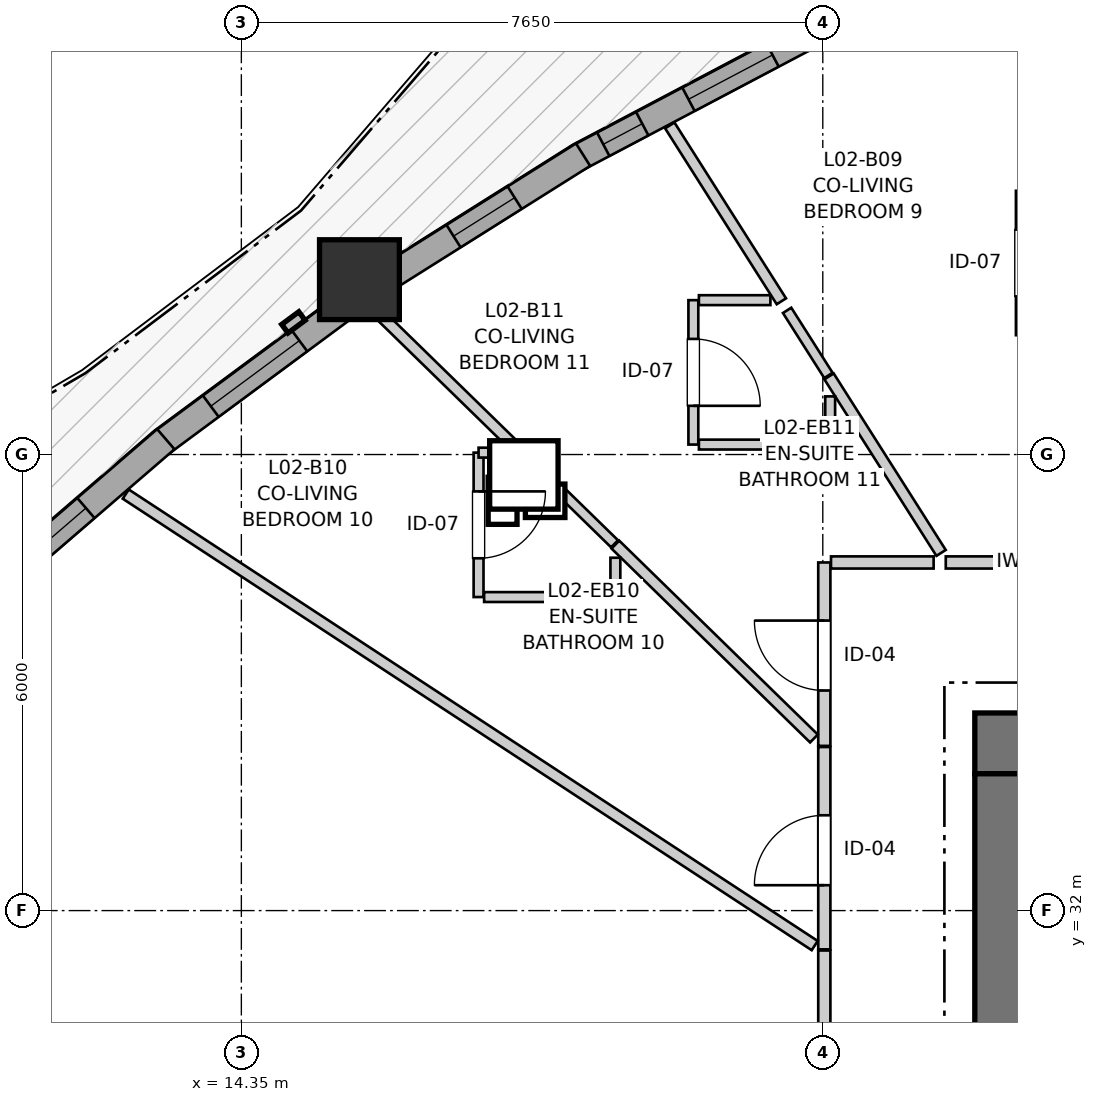
"""IFC4 building model, lengths in metres.
Left out: names, types, materials, properties, quantities, classifications, styles, units other than length and angle.
Written with IfcOpenShell. Run it as: python <this file> out.ifc"""

import sys

from ifc_helpers import new_model, si_unit, direction, frame, frame_2d, origin, origin_2d, place, context, subcontext, project, spatial, rectangle, extrude, source, transform, mapped, element, fill, save


model = new_model("IFC4")
c1 = context("Model", 3, precision=1e-05, world=origin(), true_north=direction((0.0, 1.0)))
c2 = subcontext(c1, "Body", "Model", "MODEL_VIEW")
j1 = project(units=[si_unit("LENGTHUNIT", "METRE"), si_unit("PLANEANGLEUNIT", "RADIAN")], contexts=[c1])
p1 = place(None, origin())
s1 = spatial("IfcSite", under=j1, at=p1, CompositionType="ELEMENT")
p2 = place(p1, origin())
s2 = spatial("IfcBuilding", under=s1, at=p2, CompositionType="ELEMENT")
p3 = place(p2, frame((0.0, 0.0, 11.0)))
s3 = spatial("IfcBuildingStorey", under=s2, at=p3, CompositionType="ELEMENT", Elevation=11.0)
p4 = place(p3, frame((36.7, 34.2, 0.0), z_axis=(0.0, 0.0, 1.0), x_axis=(-1.0, 0.0, 0.0)))
e1 = element("IfcWall", 1, at=p4, inside=s3, PredefinedType="SHEAR", context=c2, shape_type="SweptSolid", body=[
    extrude(rectangle(XDim=12.7, YDim=0.8, at=frame_2d((6.35, 0.0))), origin(), (0.0, 0.0, 1.0), 2.94),
])
p5 = place(p3, frame((24.4, 33.8, 0.0), z_axis=(0.0, 0.0, 1.0), x_axis=(0.0, -1.0, 0.0)))
e2 = element("IfcWall", 2, at=p5, inside=s3, PredefinedType="SHEAR", context=c2, shape_type="SweptSolid", body=[
    extrude(rectangle(XDim=15.6, YDim=0.8, at=frame_2d((7.8, 0.0))), origin(), (0.0, 0.0, 1.0), 2.94),
])
p6 = place(p5, frame((7.05, 0.0, 0.0)))
e3 = element("IfcOpeningElement", 3, at=p6, cuts=e2, PredefinedType="OPENING", context=c2, shape_type="SweptSolid", body=[
    extrude(rectangle(XDim=1.5, YDim=2.15, at=frame_2d((0.75, 1.075))), frame((0.0, 0.41, 0.0), z_axis=(0.0, -1.0, 0.0), x_axis=(1.0, 0.0, 0.0)), (0.0, 0.0, 1.0), 0.82),
])
p7 = place(p5, frame((3.52, 0.0, 0.0)))
e4 = element("IfcOpeningElement", 4, at=p7, cuts=e2, PredefinedType="OPENING", context=c2, shape_type="SweptSolid", body=[
    extrude(rectangle(XDim=0.86, YDim=2.05, at=frame_2d((0.43, 1.025))), frame((0.0, 0.41, 0.0), z_axis=(0.0, -1.0, 0.0), x_axis=(1.0, 0.0, 0.0)), (0.0, 0.0, 1.0), 0.82),
])
p8 = place(p5, frame((11.22, 0.0, 0.0)))
e5 = element("IfcOpeningElement", 5, at=p8, cuts=e2, PredefinedType="OPENING", context=c2, shape_type="SweptSolid", body=[
    extrude(rectangle(XDim=0.86, YDim=2.05, at=frame_2d((0.43, 1.025))), frame((0.0, 0.41, 0.0), z_axis=(0.0, -1.0, 0.0), x_axis=(1.0, 0.0, 0.0)), (0.0, 0.0, 1.0), 0.82),
])
m1 = source(origin(), c2, "Body", "SweptSolid", [
    extrude(rectangle(XDim=1.05, YDim=1.05, at=origin_2d()), origin(), (0.0, 0.0, 1.0), 2.94),
])
p9 = place(p3, frame((15.904, 40.301, 0.0), z_axis=(0.0, 0.0, 1.0), x_axis=(1.0, 0.0, 0.0)))
e6 = element("IfcColumn", 6, at=p9, inside=s3, PredefinedType="COLUMN", context=c2, shape_type="MappedRepresentation", body=[
    mapped(m1, transform((0.0, 0.0, 0.0), x_axis=(1.0, 0.0, 0.0), y_axis=(0.0, 1.0, 0.0), z_axis=(0.0, 0.0, 1.0), scale=1.0)),
])
p10 = place(p3, frame((21.728, 43.462, 0.0), z_axis=(0.0, 0.0, 1.0), x_axis=(-0.884404833282, -0.466720570435, 0.0)))
e7 = element("IfcWall", 7, at=p10, inside=s3, PredefinedType="SOLIDWALL", context=c2, shape_type="SweptSolid", body=[
    extrude(rectangle(XDim=3.346, YDim=0.35, at=frame_2d((1.673, 0.0))), origin(), (0.0, 0.0, 1.0), 2.42),
])
p11 = place(p10, frame((0.44, 0.0, 0.82)))
e8 = element("IfcOpeningElement", 8, at=p11, cuts=e7, PredefinedType="OPENING", context=c2, shape_type="SweptSolid", body=[
    extrude(rectangle(XDim=1.25, YDim=1.35, at=frame_2d((0.625, 0.675))), frame((0.0, 0.185, 0.0), z_axis=(0.0, -1.0, 0.0), x_axis=(1.0, 0.0, 0.0)), (0.0, 0.0, 1.0), 0.37),
])
p12 = place(p10, frame((2.378, 0.0, 0.82)))
e9 = element("IfcOpeningElement", 9, at=p12, cuts=e7, PredefinedType="OPENING", context=c2, shape_type="SweptSolid", body=[
    extrude(rectangle(XDim=0.58, YDim=1.35, at=frame_2d((0.29, 0.675))), frame((0.0, 0.185, 0.0), z_axis=(0.0, -1.0, 0.0), x_axis=(1.0, 0.0, 0.0)), (0.0, 0.0, 1.0), 0.37),
])
p13 = place(p3, frame((18.846, 41.945, 0.0), z_axis=(0.0, 0.0, 1.0), x_axis=(-0.846424281274, -0.532509094824, 0.0)))
e10 = element("IfcWall", 10, at=p13, inside=s3, PredefinedType="SOLIDWALL", context=c2, shape_type="SweptSolid", body=[
    extrude(rectangle(XDim=3.066, YDim=0.35, at=frame_2d((1.533, 0.0))), origin(), (0.0, 0.0, 1.0), 2.42),
])
p14 = place(p13, frame((1.063, 0.0, 0.82)))
e11 = element("IfcOpeningElement", 11, at=p14, cuts=e10, PredefinedType="OPENING", context=c2, shape_type="SweptSolid", body=[
    extrude(rectangle(XDim=0.95, YDim=1.35, at=frame_2d((0.475, 0.675))), frame((0.0, 0.185, 0.0), z_axis=(0.0, -1.0, 0.0), x_axis=(1.0, 0.0, 0.0)), (0.0, 0.0, 1.0), 0.37),
])
p15 = place(p3, frame((15.767, 39.981, 0.0), z_axis=(0.0, 0.0, 1.0), x_axis=(-0.803838872114, -0.59484709605, 0.0)))
e12 = element("IfcWall", 12, at=p15, inside=s3, PredefinedType="SOLIDWALL", context=c2, shape_type="SweptSolid", body=[
    extrude(rectangle(XDim=3.085, YDim=0.35, at=frame_2d((1.542, 0.0))), origin(), (0.0, 0.0, 1.0), 2.42),
])
p16 = place(p15, frame((0.812, 0.0, 0.82)))
e13 = element("IfcOpeningElement", 13, at=p16, cuts=e12, PredefinedType="OPENING", context=c2, shape_type="SweptSolid", body=[
    extrude(rectangle(XDim=1.45, YDim=1.25, at=frame_2d((0.725, 0.625))), frame((0.0, 0.185, 0.0), z_axis=(0.0, -1.0, 0.0), x_axis=(1.0, 0.0, 0.0)), (0.0, 0.0, 1.0), 0.37),
])
p17 = place(p3, frame((13.356, 38.202, 0.0), z_axis=(0.0, 0.0, 1.0), x_axis=(-0.757466232343, -0.65287434232, 0.0)))
e14 = element("IfcWall", 14, at=p17, inside=s3, PredefinedType="SOLIDWALL", context=c2, shape_type="SweptSolid", body=[
    extrude(rectangle(XDim=3.403, YDim=0.35, at=frame_2d((1.702, 0.0))), origin(), (0.0, 0.0, 1.0), 2.42),
])
p18 = place(p17, frame((1.388, 0.0, 0.82)))
e15 = element("IfcOpeningElement", 15, at=p18, cuts=e14, PredefinedType="OPENING", context=c2, shape_type="SweptSolid", body=[
    extrude(rectangle(XDim=1.45, YDim=1.25, at=frame_2d((0.725, 0.625))), frame((0.0, 0.185, 0.0), z_axis=(0.0, -1.0, 0.0), x_axis=(1.0, 0.0, 0.0)), (0.0, 0.0, 1.0), 0.37),
])
p19 = place(p3, frame((23.618, 36.58, 0.0), z_axis=(0.0, 0.0, 1.0), x_axis=(1.0, 0.0, 0.0)))
e16 = element("IfcWall", 16, at=p19, inside=s3, PredefinedType="PARTITIONING", context=c2, shape_type="SweptSolid", body=[
    extrude(rectangle(XDim=4.123, YDim=0.16, at=frame_2d((2.062, 0.0))), origin(), (0.0, 0.0, 1.0), 2.548),
])
p20 = place(p19, frame((1.603, 0.0, 0.0)))
e17 = element("IfcOpeningElement", 17, at=p20, cuts=e16, PredefinedType="OPENING", context=c2, shape_type="SweptSolid", body=[
    extrude(rectangle(XDim=0.92, YDim=2.1, at=frame_2d((0.46, 1.05))), frame((0.0, 0.09, 0.0), z_axis=(0.0, -1.0, 0.0), x_axis=(1.0, 0.0, 0.0)), (0.0, 0.0, 1.0), 0.18),
])
p21 = place(p3, frame((22.02, 27.85, 0.0), z_axis=(0.0, 0.0, 1.0), x_axis=(0.0, 1.0, 0.0)))
e18 = element("IfcWall", 18, at=p21, inside=s3, PredefinedType="PARTITIONING", context=c2, shape_type="SweptSolid", body=[
    extrude(rectangle(XDim=3.625, YDim=0.16, at=frame_2d((1.812, 0.0))), origin(), (0.0, 0.0, 1.0), 2.94),
])
p22 = place(p21, frame((1.353, 0.0, 0.0)))
e19 = element("IfcOpeningElement", 19, at=p22, cuts=e18, PredefinedType="OPENING", context=c2, shape_type="SweptSolid", body=[
    extrude(rectangle(XDim=0.96, YDim=2.1, at=frame_2d((0.48, 1.05))), frame((0.0, 0.09, 0.0), z_axis=(0.0, -1.0, 0.0), x_axis=(1.0, 0.0, 0.0)), (0.0, 0.0, 1.0), 0.18),
])
p23 = place(p3, frame((22.02, 31.49, 0.0), z_axis=(0.0, 0.0, 1.0), x_axis=(0.0, 1.0, 0.0)))
e20 = element("IfcWall", 20, at=p23, inside=s3, PredefinedType="PARTITIONING", context=c2, shape_type="SweptSolid", body=[
    extrude(rectangle(XDim=2.662, YDim=0.16, at=frame_2d((1.331, 0.0))), origin(), (0.0, 0.0, 1.0), 2.94),
])
p24 = place(p23, frame((0.844, 0.0, 0.0)))
e21 = element("IfcOpeningElement", 21, at=p24, cuts=e20, PredefinedType="OPENING", context=c2, shape_type="SweptSolid", body=[
    extrude(rectangle(XDim=0.92, YDim=2.1, at=frame_2d((0.46, 1.05))), frame((0.0, 0.09, 0.0), z_axis=(0.0, -1.0, 0.0), x_axis=(1.0, 0.0, 0.0)), (0.0, 0.0, 1.0), 0.18),
])
p25 = place(p3, frame((22.02, 34.167, 0.0), z_axis=(0.0, 0.0, 1.0), x_axis=(0.0, 1.0, 0.0)))
e22 = element("IfcWall", 22, at=p25, inside=s3, PredefinedType="PARTITIONING", context=c2, shape_type="SweptSolid", body=[
    extrude(rectangle(XDim=2.413, YDim=0.16, at=frame_2d((1.207, 0.0))), origin(), (0.0, 0.0, 1.0), 2.94),
])
p26 = place(p25, frame((0.729, 0.0, 0.0)))
e23 = element("IfcOpeningElement", 23, at=p26, cuts=e22, PredefinedType="OPENING", context=c2, shape_type="SweptSolid", body=[
    extrude(rectangle(XDim=0.92, YDim=2.1, at=frame_2d((0.46, 1.05))), frame((0.0, 0.09, 0.0), z_axis=(0.0, -1.0, 0.0), x_axis=(1.0, 0.0, 0.0)), (0.0, 0.0, 1.0), 0.18),
])
p27 = place(p3, frame((24.606, 41.47, 0.0), z_axis=(0.0, 0.0, 1.0), x_axis=(0.0, -1.0, 0.0)))
e24 = element("IfcWall", 24, at=p27, inside=s3, PredefinedType="PARTITIONING", context=c2, shape_type="SweptSolid", body=[
    extrude(rectangle(XDim=1.9, YDim=0.13, at=frame_2d((0.95, 0.0))), origin(), (0.0, 0.0, 1.0), 2.94),
])
p28 = place(p27, frame((0.51, 0.0, 0.0)))
e25 = element("IfcOpeningElement", 25, at=p28, cuts=e24, PredefinedType="OPENING", context=c2, shape_type="SweptSolid", body=[
    extrude(rectangle(XDim=0.88, YDim=2.05, at=frame_2d((0.44, 1.025))), frame((0.0, 0.075, 0.0), z_axis=(0.0, -1.0, 0.0), x_axis=(1.0, 0.0, 0.0)), (0.0, 0.0, 1.0), 0.15),
])
p29 = place(p3, frame((17.471, 38.025, 0.0), z_axis=(0.0, 0.0, 1.0), x_axis=(0.0, -1.0, 0.0)))
e26 = element("IfcWall", 26, at=p29, inside=s3, PredefinedType="PARTITIONING", context=c2, shape_type="SweptSolid", body=[
    extrude(rectangle(XDim=1.9, YDim=0.13, at=frame_2d((0.95, 0.0))), origin(), (0.0, 0.0, 1.0), 2.94),
])
p30 = place(p29, frame((0.51, 0.0, 0.0)))
e27 = element("IfcOpeningElement", 27, at=p30, cuts=e26, PredefinedType="OPENING", context=c2, shape_type="SweptSolid", body=[
    extrude(rectangle(XDim=0.88, YDim=2.05, at=frame_2d((0.44, 1.025))), frame((0.0, 0.075, 0.0), z_axis=(0.0, -1.0, 0.0), x_axis=(1.0, 0.0, 0.0)), (0.0, 0.0, 1.0), 0.15),
])
p31 = place(p3, frame((20.297, 40.031, 0.0), z_axis=(0.0, 0.0, 1.0), x_axis=(0.0, -1.0, 0.0)))
e28 = element("IfcWall", 28, at=p31, inside=s3, PredefinedType="PARTITIONING", context=c2, shape_type="SweptSolid", body=[
    extrude(rectangle(XDim=1.9, YDim=0.13, at=frame_2d((0.95, 0.0))), origin(), (0.0, 0.0, 1.0), 2.94),
])
p32 = place(p31, frame((0.51, 0.0, 0.0)))
e29 = element("IfcOpeningElement", 29, at=p32, cuts=e28, PredefinedType="OPENING", context=c2, shape_type="SweptSolid", body=[
    extrude(rectangle(XDim=0.88, YDim=2.05, at=frame_2d((0.44, 1.025))), frame((0.0, 0.075, 0.0), z_axis=(0.0, -1.0, 0.0), x_axis=(1.0, 0.0, 0.0)), (0.0, 0.0, 1.0), 0.15),
])
p33 = place(p3, frame((12.829, 37.479, 0.0), z_axis=(0.0, 0.0, 1.0), x_axis=(0.836435846472, -0.548064845376, 0.0)))
e30 = element("IfcWall", 30, at=p33, inside=s3, PredefinedType="PARTITIONING", context=c2, shape_type="SweptSolid", body=[
    extrude(rectangle(XDim=10.838, YDim=0.145, at=frame_2d((5.419, 0.0))), origin(), (0.0, 0.0, 1.0), 2.94),
])
p34 = place(p3, frame((19.271, 36.815, 0.0), z_axis=(0.0, 0.0, 1.0), x_axis=(0.71551452036, -0.698597860828, 0.0)))
e31 = element("IfcWall", 31, at=p34, inside=s3, PredefinedType="PARTITIONING", context=c2, shape_type="SweptSolid", body=[
    extrude(rectangle(XDim=3.651, YDim=0.145, at=frame_2d((1.826, 0.0))), origin(), (0.0, 0.0, 1.0), 2.308),
])
p35 = place(p3, frame((22.082, 39.028, 0.0), z_axis=(0.0, 0.0, 1.0), x_axis=(0.535944885386, -0.844252971465, 0.0)))
e32 = element("IfcWall", 32, at=p35, inside=s3, PredefinedType="PARTITIONING", context=c2, shape_type="SweptSolid", body=[
    extrude(rectangle(XDim=2.751, YDim=0.145, at=frame_2d((1.375, 0.0))), origin(), (0.0, 0.0, 1.0), 2.94),
])
p36 = place(p3, frame((16.034, 39.974, 0.0), z_axis=(0.0, 0.0, 1.0), x_axis=(0.715628345471, -0.69848126042, 0.0)))
e33 = element("IfcWall", 33, at=p36, inside=s3, PredefinedType="PARTITIONING", context=c2, shape_type="SweptSolid", body=[
    extrude(rectangle(XDim=2.791, YDim=0.145, at=frame_2d((1.396, 0.0))), origin(), (0.0, 0.0, 1.0), 2.308),
])
p37 = place(p3, frame((19.987, 42.33, 0.0), z_axis=(0.0, 0.0, 1.0), x_axis=(0.535808561115, -0.844339496788, 0.0)))
e34 = element("IfcWall", 34, at=p37, inside=s3, PredefinedType="PARTITIONING", context=c2, shape_type="SweptSolid", body=[
    extrude(rectangle(XDim=2.74, YDim=0.145, at=frame_2d((1.37, 0.0))), origin(), (0.0, 0.0, 1.0), 2.94),
])
p38 = place(p3, frame((17.544, 36.125, 0.0), z_axis=(0.0, 0.0, 1.0), x_axis=(1.0, 0.0, 0.0)))
e35 = element("IfcWall", 35, at=p38, inside=s3, PredefinedType="PARTITIONING", context=c2, shape_type="SweptSolid", body=[
    extrude(rectangle(XDim=1.727, YDim=0.13, at=frame_2d((0.864, 0.0))), origin(), (0.0, 0.0, 1.0), 2.94),
])
p39 = place(p3, frame((20.37, 38.131, 0.0), z_axis=(0.0, 0.0, 1.0), x_axis=(1.0, 0.0, 0.0)))
e36 = element("IfcWall", 36, at=p39, inside=s3, PredefinedType="PARTITIONING", context=c2, shape_type="SweptSolid", body=[
    extrude(rectangle(XDim=1.727, YDim=0.13, at=frame_2d((0.863, 0.0))), origin(), (0.0, 0.0, 1.0), 2.94),
])
p40 = place(p3, frame((18.042, 38.014, 0.0), z_axis=(0.0, 0.0, 1.0), x_axis=(0.715729497461, -0.698377610225, 0.0)))
e37 = element("IfcWall", 37, at=p40, inside=s3, PredefinedType="PARTITIONING", context=c2, shape_type="SweptSolid", body=[
    extrude(rectangle(XDim=1.702, YDim=0.13, at=frame_2d((0.851, 0.0))), origin(), (0.0, 0.0, 1.0), 2.308),
])
p41 = place(p3, frame((22.108, 36.58, 0.0), z_axis=(0.0, 0.0, 1.0), x_axis=(1.0, 0.0, 0.0)))
e38 = element("IfcWall", 38, at=p41, inside=s3, PredefinedType="PARTITIONING", context=c2, shape_type="SweptSolid", body=[
    extrude(rectangle(XDim=1.35, YDim=0.16, at=frame_2d((0.675, 0.0))), origin(), (0.0, 0.0, 1.0), 2.94),
])
p42 = place(p3, frame((20.37, 40.031, 0.0), z_axis=(0.0, 0.0, 1.0), x_axis=(1.0, 0.0, 0.0)))
e39 = element("IfcWall", 39, at=p42, inside=s3, PredefinedType="PARTITIONING", context=c2, shape_type="SweptSolid", body=[
    extrude(rectangle(XDim=0.941, YDim=0.13, at=frame_2d((0.47, 0.0))), origin(), (0.0, 0.0, 1.0), 2.94),
])
p43 = place(p3, frame((21.531, 39.897, 0.0), z_axis=(0.0, 0.0, 1.0), x_axis=(0.536002688679, -0.844216274262, 0.0)))
e40 = element("IfcWall", 40, at=p43, inside=s3, PredefinedType="PARTITIONING", context=c2, shape_type="SweptSolid", body=[
    extrude(rectangle(XDim=1.014, YDim=0.13, at=frame_2d((0.507, 0.0))), origin(), (0.0, 0.0, 1.0), 2.94),
])
p44 = place(p3, frame((22.097, 38.204, 0.0), z_axis=(0.0, 0.0, 1.0), x_axis=(0.0, 1.0, 0.0)))
e41 = element("IfcWall", 41, at=p44, inside=s3, PredefinedType="PARTITIONING", context=c2, shape_type="SweptSolid", body=[
    extrude(rectangle(XDim=0.561, YDim=0.13, at=frame_2d((0.28, 0.0))), origin(), (0.0, 0.0, 1.0), 2.94),
])
p45 = place(p3, frame((19.271, 36.198, 0.0), z_axis=(0.0, 0.0, 1.0), x_axis=(0.0, 1.0, 0.0)))
e42 = element("IfcWall", 42, at=p45, inside=s3, PredefinedType="PARTITIONING", context=c2, shape_type="SweptSolid", body=[
    extrude(rectangle(XDim=0.444, YDim=0.13, at=frame_2d((0.222, 0.0))), origin(), (0.0, 0.0, 1.0), 2.94),
])
p46 = place(p3, frame((17.471, 38.025, 0.0), z_axis=(0.0, 0.0, 1.0), x_axis=(1.0, 0.0, 0.0)))
e43 = element("IfcWall", 43, at=p46, inside=s3, PredefinedType="PARTITIONING", context=c2, shape_type="SweptSolid", body=[
    extrude(rectangle(XDim=0.47, YDim=0.13, at=frame_2d((0.235, 0.0))), origin(), (0.0, 0.0, 1.0), 2.94),
])
m2 = source(origin(), c2, "Body", "SweptSolid", [
    extrude(rectangle(XDim=1.25, YDim=1.35, at=frame_2d((0.625, 0.675))), frame((0.0, 0.03, 0.0), z_axis=(0.0, -1.0, 0.0), x_axis=(1.0, 0.0, 0.0)), (0.0, 0.0, 1.0), 0.06),
])
p47 = place(p11, origin())
e44 = element("IfcWindow", 44, at=p47, inside=s3, PartitioningType="SINGLE_PANEL", PredefinedType="WINDOW", context=c2, shape_type="MappedRepresentation", body=[
    mapped(m2, transform((0.0, 0.0, 0.0), x_axis=(1.0, 0.0, 0.0), y_axis=(0.0, 1.0, 0.0), z_axis=(0.0, 0.0, 1.0), scale=1.0)),
])
fill(e8, e44)
m3 = source(origin(), c2, "Body", "SweptSolid", [
    extrude(rectangle(XDim=0.58, YDim=1.35, at=frame_2d((0.29, 0.675))), frame((0.0, 0.03, 0.0), z_axis=(0.0, -1.0, 0.0), x_axis=(1.0, 0.0, 0.0)), (0.0, 0.0, 1.0), 0.06),
])
p48 = place(p12, origin())
e45 = element("IfcWindow", 45, at=p48, inside=s3, PartitioningType="SINGLE_PANEL", PredefinedType="WINDOW", context=c2, shape_type="MappedRepresentation", body=[
    mapped(m3, transform((0.0, 0.0, 0.0), x_axis=(1.0, 0.0, 0.0), y_axis=(0.0, 1.0, 0.0), z_axis=(0.0, 0.0, 1.0), scale=1.0)),
])
fill(e9, e45)
m4 = source(origin(), c2, "Body", "SweptSolid", [
    extrude(rectangle(XDim=0.95, YDim=1.35, at=frame_2d((0.475, 0.675))), frame((0.0, 0.03, 0.0), z_axis=(0.0, -1.0, 0.0), x_axis=(1.0, 0.0, 0.0)), (0.0, 0.0, 1.0), 0.06),
])
p49 = place(p14, origin())
e46 = element("IfcWindow", 46, at=p49, inside=s3, PartitioningType="SINGLE_PANEL", PredefinedType="WINDOW", context=c2, shape_type="MappedRepresentation", body=[
    mapped(m4, transform((0.0, 0.0, 0.0), x_axis=(1.0, 0.0, 0.0), y_axis=(0.0, 1.0, 0.0), z_axis=(0.0, 0.0, 1.0), scale=1.0)),
])
fill(e11, e46)
m5 = source(origin(), c2, "Body", "SweptSolid", [
    extrude(rectangle(XDim=1.45, YDim=1.25, at=frame_2d((0.725, 0.625))), frame((0.0, 0.03, 0.0), z_axis=(0.0, -1.0, 0.0), x_axis=(1.0, 0.0, 0.0)), (0.0, 0.0, 1.0), 0.06),
])
p50 = place(p16, origin())
e47 = element("IfcWindow", 47, at=p50, inside=s3, PartitioningType="SINGLE_PANEL", PredefinedType="WINDOW", context=c2, shape_type="MappedRepresentation", body=[
    mapped(m5, transform((0.0, 0.0, 0.0), x_axis=(1.0, 0.0, 0.0), y_axis=(0.0, 1.0, 0.0), z_axis=(0.0, 0.0, 1.0), scale=1.0)),
])
fill(e13, e47)
p51 = place(p18, origin())
e48 = element("IfcWindow", 48, at=p51, inside=s3, PartitioningType="SINGLE_PANEL", PredefinedType="WINDOW", context=c2, shape_type="MappedRepresentation", body=[
    mapped(m5, transform((0.0, 0.0, 0.0), x_axis=(1.0, 0.0, 0.0), y_axis=(0.0, 1.0, 0.0), z_axis=(0.0, 0.0, 1.0), scale=1.0)),
])
fill(e15, e48)
m6 = source(origin(), c2, "Body", "SweptSolid", [
    extrude(rectangle(XDim=0.92, YDim=2.1, at=frame_2d((0.46, 1.05))), frame((0.0, 0.025, 0.0), z_axis=(0.0, -1.0, 0.0), x_axis=(1.0, 0.0, 0.0)), (0.0, 0.0, 1.0), 0.05),
])
p52 = place(p24, origin())
e49 = element("IfcDoor", 49, at=p52, inside=s3, OperationType="SINGLE_SWING_LEFT", PredefinedType="DOOR", context=c2, shape_type="MappedRepresentation", body=[
    mapped(m6, transform((0.0, 0.0, 0.0), x_axis=(1.0, 0.0, 0.0), y_axis=(0.0, 1.0, 0.0), z_axis=(0.0, 0.0, 1.0), scale=1.0)),
])
fill(e21, e49)
p53 = place(p26, origin())
e50 = element("IfcDoor", 50, at=p53, inside=s3, OperationType="SINGLE_SWING_RIGHT", PredefinedType="DOOR", context=c2, shape_type="MappedRepresentation", body=[
    mapped(m6, transform((0.0, 0.0, 0.0), x_axis=(1.0, 0.0, 0.0), y_axis=(0.0, 1.0, 0.0), z_axis=(0.0, 0.0, 1.0), scale=1.0)),
])
fill(e23, e50)
m7 = source(origin(), c2, "Body", "SweptSolid", [
    extrude(rectangle(XDim=0.88, YDim=2.05, at=frame_2d((0.44, 1.025))), frame((0.0, 0.025, 0.0), z_axis=(0.0, -1.0, 0.0), x_axis=(1.0, 0.0, 0.0)), (0.0, 0.0, 1.0), 0.05),
])
p54 = place(p30, origin())
e51 = element("IfcDoor", 51, at=p54, inside=s3, OperationType="SINGLE_SWING_LEFT", PredefinedType="DOOR", context=c2, shape_type="MappedRepresentation", body=[
    mapped(m7, transform((0.0, 0.0, 0.0), x_axis=(1.0, 0.0, 0.0), y_axis=(0.0, 1.0, 0.0), z_axis=(0.0, 0.0, 1.0), scale=1.0)),
])
fill(e27, e51)
p55 = place(p32, origin())
e52 = element("IfcDoor", 52, at=p55, inside=s3, OperationType="SINGLE_SWING_RIGHT", PredefinedType="DOOR", context=c2, shape_type="MappedRepresentation", body=[
    mapped(m7, transform((0.0, 0.0, 0.0), x_axis=(1.0, 0.0, 0.0), y_axis=(0.0, 1.0, 0.0), z_axis=(0.0, 0.0, 1.0), scale=1.0)),
])
fill(e29, e52)
save(model, sys.argv[1])
